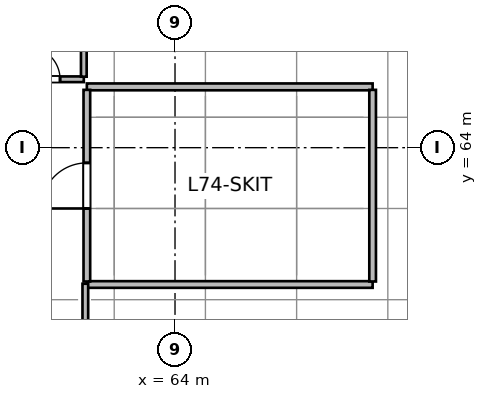
"""IFC4 building model, lengths in metres.
Left out: names, types, materials, properties, quantities, classifications, styles, units other than length and angle.
Written with IfcOpenShell. Run it as: python <this file> out.ifc"""

import sys

from ifc_helpers import new_model, si_unit, direction, frame, frame_2d, origin, place, context, subcontext, project, spatial, rectangle, extrude, source, transform, mapped, element, fill, save


model = new_model("IFC4")
c1 = context("Model", 3, precision=1e-05, world=origin(), true_north=direction((0.0, 1.0)))
c2 = subcontext(c1, "Body", "Model", "MODEL_VIEW")
j1 = project(units=[si_unit("LENGTHUNIT", "METRE"), si_unit("PLANEANGLEUNIT", "RADIAN")], contexts=[c1])
p1 = place(None, origin())
s1 = spatial("IfcSite", under=j1, at=p1, CompositionType="ELEMENT")
p2 = place(p1, origin())
s2 = spatial("IfcBuilding", under=s1, at=p2, CompositionType="ELEMENT")
p3 = place(p2, frame((0.0, 0.0, 303.0)))
s3 = spatial("IfcBuildingStorey", under=s2, at=p3, CompositionType="ELEMENT", Elevation=303.0)
m1 = source(origin(), c2, "Body", "SweptSolid", [
    extrude(rectangle(XDim=2.1, YDim=0.15, at=frame_2d((1.05, 0.0))), origin(), (0.0, 0.0, 1.0), 4.54),
])
p4 = place(p3, frame((59.5, 65.8, 0.0), z_axis=(0.0, 0.0, 1.0), x_axis=(1.0, 0.0, 0.0)))
e1 = element("IfcWall", 1, at=p4, inside=s3, PredefinedType="PARTITIONING", context=c2, shape_type="MappedRepresentation", body=[
    mapped(m1, transform((0.0, 0.0, 0.0), scale=1.0)),
])
p5 = place(p4, frame((0.625, 0.0, 0.0)))
e2 = element("IfcOpeningElement", 2, at=p5, cuts=e1, PredefinedType="OPENING", context=c2, shape_type="SweptSolid", body=[
    extrude(rectangle(XDim=0.85, YDim=2.1, at=frame_2d((0.425, 1.05))), frame((0.0, 0.085, 0.0), z_axis=(0.0, -1.0, 0.0), x_axis=(1.0, 0.0, 0.0)), (0.0, 0.0, 1.0), 0.17),
])
m2 = source(origin(), c2, "Body", "SweptSolid", [
    extrude(rectangle(XDim=3.565, YDim=0.15, at=frame_2d((1.783, 0.0))), origin(), (0.0, 0.0, 1.0), 4.54),
])
p6 = place(p3, frame((61.6, 65.867, 0.0), z_axis=(0.0, 0.0, 1.0), x_axis=(0.0, 1.0, 0.0)))
e3 = element("IfcWall", 3, at=p6, inside=s3, PredefinedType="PARTITIONING", context=c2, shape_type="MappedRepresentation", body=[
    mapped(m2, transform((0.0, 0.0, 0.0), scale=1.0)),
])
m3 = source(origin(), c2, "Body", "SweptSolid", [
    extrude(rectangle(XDim=7.52, YDim=0.175, at=frame_2d((3.76, 0.0))), origin(), (0.0, 0.0, 1.0), 4.54),
])
p7 = place(p3, frame((61.68, 60.4, 0.0), z_axis=(0.0, 0.0, 1.0), x_axis=(1.0, 0.0, 0.0)))
e4 = element("IfcWall", 4, at=p7, inside=s3, PredefinedType="PARTITIONING", context=c2, shape_type="MappedRepresentation", body=[
    mapped(m3, transform((0.0, 0.0, 0.0), scale=1.0)),
])
m4 = source(origin(), c2, "Body", "SweptSolid", [
    extrude(rectangle(XDim=7.52, YDim=0.18, at=frame_2d((3.76, 0.0))), origin(), (0.0, 0.0, 1.0), 4.54),
])
p8 = place(p3, frame((61.68, 65.6, 0.0), z_axis=(0.0, 0.0, 1.0), x_axis=(1.0, 0.0, 0.0)))
e5 = element("IfcWall", 5, at=p8, inside=s3, PredefinedType="PLUMBINGWALL", context=c2, shape_type="MappedRepresentation", body=[
    mapped(m4, transform((0.0, 0.0, 0.0), scale=1.0)),
])
m5 = source(origin(), c2, "Body", "SweptSolid", [
    extrude(rectangle(XDim=5.042, YDim=0.175, at=frame_2d((2.521, 0.0))), origin(), (0.0, 0.0, 1.0), 4.54),
])
p9 = place(p3, frame((61.68, 60.479, 0.0), z_axis=(0.0, 0.0, 1.0), x_axis=(0.0, 1.0, 0.0)))
e6 = element("IfcWall", 6, at=p9, inside=s3, PredefinedType="PARTITIONING", context=c2, shape_type="MappedRepresentation", body=[
    mapped(m5, transform((0.0, 0.0, 0.0), scale=1.0)),
])
p10 = place(p9, frame((1.921, 0.0, 0.0)))
e7 = element("IfcOpeningElement", 7, at=p10, cuts=e6, PredefinedType="OPENING", context=c2, shape_type="SweptSolid", body=[
    extrude(rectangle(XDim=1.2, YDim=2.15, at=frame_2d((0.6, 1.075))), frame((0.0, 0.098, 0.0), z_axis=(0.0, -1.0, 0.0), x_axis=(1.0, 0.0, 0.0)), (0.0, 0.0, 1.0), 0.195),
])
p11 = place(p3, frame((69.2, 60.479, 0.0), z_axis=(0.0, 0.0, 1.0), x_axis=(0.0, 1.0, 0.0)))
e8 = element("IfcWall", 8, at=p11, inside=s3, PredefinedType="PARTITIONING", context=c2, shape_type="MappedRepresentation", body=[
    mapped(m5, transform((0.0, 0.0, 0.0), scale=1.0)),
])
m6 = source(origin(), c2, "Body", "SweptSolid", [
    extrude(rectangle(XDim=2.46, YDim=0.15, at=frame_2d((1.23, 0.0))), origin(), (0.0, 0.0, 1.0), 4.54),
])
p12 = place(p3, frame((61.64, 57.96, 0.0), z_axis=(0.0, 0.0, 1.0), x_axis=(0.0, 1.0, 0.0)))
e9 = element("IfcWall", 9, at=p12, inside=s3, PredefinedType="PARTITIONING", context=c2, shape_type="MappedRepresentation", body=[
    mapped(m6, transform((0.0, 0.0, 0.0), scale=1.0)),
])
m7 = source(origin(), c2, "Body", "SweptSolid", [
    extrude(rectangle(XDim=0.85, YDim=2.1, at=frame_2d((0.425, 1.05))), frame((0.0, 0.025, 0.0), z_axis=(0.0, -1.0, 0.0), x_axis=(1.0, 0.0, 0.0)), (0.0, 0.0, 1.0), 0.05),
])
p13 = place(p5, origin())
e10 = element("IfcDoor", 10, at=p13, inside=s3, OperationType="SINGLE_SWING_LEFT", PredefinedType="DOOR", context=c2, shape_type="MappedRepresentation", body=[
    mapped(m7, transform((0.0, 0.0, 0.0), scale=1.0)),
])
fill(e2, e10)
m8 = source(origin(), c2, "Body", "SweptSolid", [
    extrude(rectangle(XDim=1.2, YDim=2.15, at=frame_2d((0.6, 1.075))), frame((0.0, 0.025, 0.0), z_axis=(0.0, -1.0, 0.0), x_axis=(1.0, 0.0, 0.0)), (0.0, 0.0, 1.0), 0.05),
])
p14 = place(p10, origin())
e11 = element("IfcDoor", 11, at=p14, inside=s3, OperationType="SINGLE_SWING_LEFT", PredefinedType="DOOR", context=c2, shape_type="MappedRepresentation", body=[
    mapped(m8, transform((0.0, 0.0, 0.0), scale=1.0)),
])
fill(e7, e11)
save(model, sys.argv[1])
